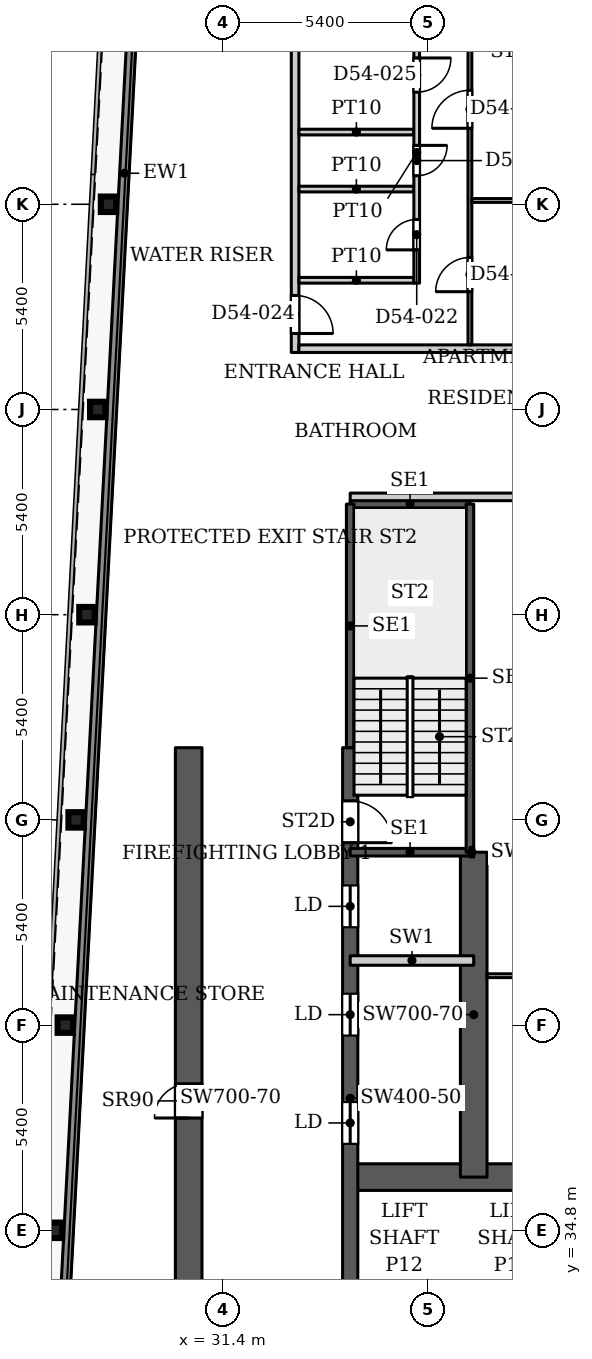
"""IFC4 building model, lengths in metres.
Left out: names, types, materials, properties, quantities, classifications, styles, units other than length and angle.
Written with IfcOpenShell. Run it as: python <this file> out.ifc"""

import sys

from ifc_helpers import new_model, si_unit, direction, frame, frame_2d, origin, origin_2d, place, context, subcontext, project, spatial, rectangle, i_section, extrude, source, transform, mapped, element, fill, save


model = new_model("IFC4")
c1 = context("Model", 3, precision=1e-05, world=origin(), true_north=direction((0.0, 1.0)))
c2 = subcontext(c1, "Body", "Model", "MODEL_VIEW")
j1 = project(units=[si_unit("LENGTHUNIT", "METRE"), si_unit("PLANEANGLEUNIT", "RADIAN")], contexts=[c1])
p1 = place(None, origin())
s1 = spatial("IfcSite", under=j1, at=p1, CompositionType="ELEMENT")
p2 = place(p1, origin())
s2 = spatial("IfcBuilding", under=s1, at=p2, CompositionType="ELEMENT")
p3 = place(p2, frame((0.0, 0.0, 231.8)))
s3 = spatial("IfcBuildingStorey", under=s2, at=p3, CompositionType="ELEMENT", Elevation=231.8)
for number, where, z_axis, x_axis in (
    (1, (26.969, 34.8, 0.0), (0.0, 0.0, 1.0), (1.0, 0.0, 0.0)),
    (2, (27.253, 40.2, 0.0), (0.0, 0.0, 1.0), (1.0, 0.0, 0.0)),
    (3, (27.537, 45.6, 0.0), (0.0, 0.0, 1.0), (1.0, 0.0, 0.0)),
    (4, (27.822, 51.0, 0.0), (0.0, 0.0, 1.0), (1.0, 0.0, 0.0)),
    (5, (28.106, 56.4, 0.0), (0.0, 0.0, 1.0), (1.0, 0.0, 0.0)),
    (6, (28.39, 61.8, 0.0), (0.0, 0.0, 1.0), (1.0, 0.0, 0.0)),
):
    element("IfcColumn", number, at=place(p3, frame(where, z_axis=z_axis, x_axis=x_axis)), inside=s3, PredefinedType="COLUMN", context=c2, shape_type="SweptSolid", body=[
        extrude(i_section(OverallWidth=0.404, OverallDepth=0.407, WebThickness=0.027, FlangeThickness=0.044, FilletRadius=0.012, at=origin_2d()), origin(), (0.0, 0.0, 1.0), 3.9),
    ])
p4 = place(p3, frame((34.75, 36.2, 0.0), z_axis=(0.0, 0.0, 1.0), x_axis=(1.0, 0.0, 0.0)))
e7 = element("IfcWall", 7, at=p4, inside=s3, PredefinedType="SHEAR", context=c2, shape_type="SweptSolid", body=[
    extrude(rectangle(XDim=18.4, YDim=0.7, at=frame_2d((9.2, 0.0))), origin(), (0.0, 0.0, 1.0), 3.9),
])
p5 = place(p4, frame((16.9, 0.0, 0.0)))
e8 = element("IfcOpeningElement", 8, at=p5, cuts=e7, PredefinedType="OPENING", context=c2, shape_type="SweptSolid", body=[
    extrude(rectangle(XDim=1.0, YDim=2.2, at=frame_2d((0.5, 1.1))), frame((0.0, 0.36, 0.0), z_axis=(0.0, -1.0, 0.0), x_axis=(1.0, 0.0, 0.0)), (0.0, 0.0, 1.0), 0.72),
])
p6 = place(p3, frame((34.75, 29.05, 0.0), z_axis=(0.0, 0.0, 1.0), x_axis=(0.0, 1.0, 0.0)))
e9 = element("IfcWall", 9, at=p6, inside=s3, PredefinedType="SHEAR", context=c2, shape_type="SweptSolid", body=[
    extrude(rectangle(XDim=18.45, YDim=0.4, at=frame_2d((9.225, 0.0))), origin(), (0.0, 0.0, 1.0), 3.9),
])
p7 = place(p6, frame((8.025, 0.0, 0.0)))
e10 = element("IfcOpeningElement", 10, at=p7, cuts=e9, PredefinedType="OPENING", context=c2, shape_type="SweptSolid", body=[
    extrude(rectangle(XDim=1.1, YDim=2.2, at=frame_2d((0.55, 1.1))), frame((0.0, 0.21, 0.0), z_axis=(0.0, -1.0, 0.0), x_axis=(1.0, 0.0, 0.0)), (0.0, 0.0, 1.0), 0.42),
])
p8 = place(p6, frame((10.875, 0.0, 0.0)))
e11 = element("IfcOpeningElement", 11, at=p8, cuts=e9, PredefinedType="OPENING", context=c2, shape_type="SweptSolid", body=[
    extrude(rectangle(XDim=1.1, YDim=2.2, at=frame_2d((0.55, 1.1))), frame((0.0, 0.21, 0.0), z_axis=(0.0, -1.0, 0.0), x_axis=(1.0, 0.0, 0.0)), (0.0, 0.0, 1.0), 0.42),
])
p9 = place(p6, frame((13.725, 0.0, 0.0)))
e12 = element("IfcOpeningElement", 12, at=p9, cuts=e9, PredefinedType="OPENING", context=c2, shape_type="SweptSolid", body=[
    extrude(rectangle(XDim=1.1, YDim=2.2, at=frame_2d((0.55, 1.1))), frame((0.0, 0.21, 0.0), z_axis=(0.0, -1.0, 0.0), x_axis=(1.0, 0.0, 0.0)), (0.0, 0.0, 1.0), 0.42),
])
p10 = place(p6, frame((15.95, 0.0, 0.0)))
e13 = element("IfcOpeningElement", 13, at=p10, cuts=e9, PredefinedType="OPENING", context=c2, shape_type="SweptSolid", body=[
    extrude(rectangle(XDim=1.1, YDim=2.2, at=frame_2d((0.55, 1.1))), frame((0.0, 0.21, 0.0), z_axis=(0.0, -1.0, 0.0), x_axis=(1.0, 0.0, 0.0)), (0.0, 0.0, 1.0), 0.42),
])
p11 = place(p3, frame((38.0, 36.2, 0.0), z_axis=(0.0, 0.0, 1.0), x_axis=(0.0, 1.0, 0.0)))
e14 = element("IfcWall", 14, at=p11, inside=s3, PredefinedType="SHEAR", context=c2, shape_type="SweptSolid", body=[
    extrude(rectangle(XDim=8.55, YDim=0.7, at=frame_2d((4.275, 0.0))), origin(), (0.0, 0.0, 1.0), 3.9),
])
p12 = place(p3, frame((30.5, 29.05, 0.0), z_axis=(0.0, 0.0, 1.0), x_axis=(0.0, 1.0, 0.0)))
e15 = element("IfcWall", 15, at=p12, inside=s3, PredefinedType="SHEAR", context=c2, shape_type="SweptSolid", body=[
    extrude(rectangle(XDim=18.45, YDim=0.7, at=frame_2d((9.225, 0.0))), origin(), (0.0, 0.0, 1.0), 3.9),
])
p13 = place(p12, frame((1.5, 0.0, 0.0)))
e16 = element("IfcOpeningElement", 16, at=p13, cuts=e15, PredefinedType="OPENING", context=c2, shape_type="SweptSolid", body=[
    extrude(rectangle(XDim=0.9, YDim=2.2, at=frame_2d((0.45, 1.1))), frame((0.0, 0.36, 0.0), z_axis=(0.0, -1.0, 0.0), x_axis=(1.0, 0.0, 0.0)), (0.0, 0.0, 1.0), 0.72),
])
p14 = place(p12, frame((8.705, 0.0, 0.0)))
e17 = element("IfcOpeningElement", 17, at=p14, cuts=e15, PredefinedType="OPENING", context=c2, shape_type="SweptSolid", body=[
    extrude(rectangle(XDim=0.9, YDim=2.2, at=frame_2d((0.45, 1.1))), frame((0.0, 0.36, 0.0), z_axis=(0.0, -1.0, 0.0), x_axis=(1.0, 0.0, 0.0)), (0.0, 0.0, 1.0), 0.72),
])
p15 = place(p3, frame((27.195, 31.969, 0.0), z_axis=(0.0, 0.0, 1.0), x_axis=(0.052555284099, 0.998618016117, 0.0)))
e18 = element("IfcWall", 18, at=p15, inside=s3, PredefinedType="SOLIDWALL", context=c2, shape_type="SweptSolid", body=[
    extrude(rectangle(XDim=61.38, YDim=0.25, at=frame_2d((30.69, 0.0))), origin(), (0.0, 0.0, 1.0), 3.75),
])
for number, where, z_axis, x_axis in (
    (19, (34.75, 44.75, 0.0), (0.0, 0.0, 1.0), (1.0, 0.0, 0.0)),
    (20, (34.75, 53.91, 0.0), (0.0, 0.0, 1.0), (1.0, 0.0, 0.0)),
):
    element("IfcWall", number, at=place(p3, frame(where, z_axis=z_axis, x_axis=x_axis)), inside=s3, PredefinedType="SHEAR", context=c2, shape_type="SweptSolid", body=[
        extrude(rectangle(XDim=3.15, YDim=0.2, at=frame_2d((1.575, 0.0))), origin(), (0.0, 0.0, 1.0), 3.9),
    ])
p16 = place(p3, frame((34.75, 47.5, 0.0), z_axis=(0.0, 0.0, 1.0), x_axis=(0.0, 1.0, 0.0)))
e21 = element("IfcWall", 21, at=p16, inside=s3, PredefinedType="SHEAR", context=c2, shape_type="SweptSolid", body=[
    extrude(rectangle(XDim=6.41, YDim=0.2, at=frame_2d((3.205, 0.0))), origin(), (0.0, 0.0, 1.0), 3.9),
])
p17 = place(p3, frame((37.9, 44.75, 0.0), z_axis=(0.0, 0.0, 1.0), x_axis=(0.0, 1.0, 0.0)))
e22 = element("IfcWall", 22, at=p17, inside=s3, PredefinedType="SHEAR", context=c2, shape_type="SweptSolid", body=[
    extrude(rectangle(XDim=9.16, YDim=0.2, at=frame_2d((4.58, 0.0))), origin(), (0.0, 0.0, 1.0), 3.9),
])
p18 = place(p3, frame((34.75, 41.9, 0.0), z_axis=(0.0, 0.0, 1.0), x_axis=(1.0, 0.0, 0.0)))
e23 = element("IfcWall", 23, at=p18, inside=s3, PredefinedType="PARTITIONING", context=c2, shape_type="SweptSolid", body=[
    extrude(rectangle(XDim=3.25, YDim=0.25, at=frame_2d((1.625, 0.0))), origin(), (0.0, 0.0, 1.0), 3.9),
])
p19 = place(p3, frame((37.9, 44.75, 0.0), z_axis=(0.0, 0.0, 1.0), x_axis=(1.0, 0.0, 0.0)))
e24 = element("IfcWall", 24, at=p19, inside=s3, PredefinedType="PARTITIONING", context=c2, shape_type="SweptSolid", body=[
    extrude(rectangle(XDim=0.1, YDim=0.25, at=frame_2d((0.05, 0.0))), origin(), (0.0, 0.0, 1.0), 3.9),
])
p20 = place(p3, frame((33.3, 57.9, 0.0), z_axis=(0.0, 0.0, 1.0), x_axis=(0.0, 1.0, 0.0)))
e25 = element("IfcWall", 25, at=p20, inside=s3, PredefinedType="PARTITIONING", context=c2, shape_type="SweptSolid", body=[
    extrude(rectangle(XDim=17.6, YDim=0.2, at=frame_2d((8.8, 0.0))), origin(), (0.0, 0.0, 1.0), 3.6),
])
p21 = place(p20, frame((0.5, 0.0, 0.0)))
e26 = element("IfcOpeningElement", 26, at=p21, cuts=e25, PredefinedType="OPENING", context=c2, shape_type="SweptSolid", body=[
    extrude(rectangle(XDim=1.0, YDim=2.1, at=frame_2d((0.5, 1.05))), frame((0.0, 0.11, 0.0), z_axis=(0.0, -1.0, 0.0), x_axis=(1.0, 0.0, 0.0)), (0.0, 0.0, 1.0), 0.22),
])
p22 = place(p20, frame((16.1, 0.0, 0.0)))
e27 = element("IfcOpeningElement", 27, at=p22, cuts=e25, PredefinedType="OPENING", context=c2, shape_type="SweptSolid", body=[
    extrude(rectangle(XDim=1.0, YDim=2.1, at=frame_2d((0.5, 1.05))), frame((0.0, 0.11, 0.0), z_axis=(0.0, -1.0, 0.0), x_axis=(1.0, 0.0, 0.0)), (0.0, 0.0, 1.0), 0.22),
])
p23 = place(p3, frame((33.4, 58.0, 0.0), z_axis=(0.0, 0.0, 1.0), x_axis=(1.0, 0.0, 0.0)))
e28 = element("IfcWall", 28, at=p23, inside=s3, PredefinedType="PARTITIONING", context=c2, shape_type="SweptSolid", body=[
    extrude(rectangle(XDim=12.5, YDim=0.2, at=frame_2d((6.25, 0.0))), origin(), (0.0, 0.0, 1.0), 3.6),
])
for number, where, z_axis, x_axis in (
    (29, (33.4, 59.8, 0.0), (0.0, 0.0, 1.0), (1.0, 0.0, 0.0)),
    (30, (33.4, 62.2, 0.0), (0.0, 0.0, 1.0), (1.0, 0.0, 0.0)),
    (31, (33.4, 63.7, 0.0), (0.0, 0.0, 1.0), (1.0, 0.0, 0.0)),
):
    element("IfcWall", number, at=place(p3, frame(where, z_axis=z_axis, x_axis=x_axis)), inside=s3, PredefinedType="PARTITIONING", context=c2, shape_type="SweptSolid", body=[
        extrude(rectangle(XDim=3.025, YDim=0.15, at=frame_2d((1.513, 0.0))), origin(), (0.0, 0.0, 1.0), 3.6),
    ])
p24 = place(p3, frame((34.75, 54.1, 0.0), z_axis=(0.0, 0.0, 1.0), x_axis=(1.0, 0.0, 0.0)))
e32 = element("IfcWall", 32, at=p24, inside=s3, PredefinedType="PARTITIONING", context=c2, shape_type="SweptSolid", body=[
    extrude(rectangle(XDim=11.15, YDim=0.2, at=frame_2d((5.575, 0.0))), origin(), (0.0, 0.0, 1.0), 3.6),
])
p25 = place(p24, frame((5.075, 0.0, 0.0)))
e33 = element("IfcOpeningElement", 33, at=p25, cuts=e32, PredefinedType="OPENING", context=c2, shape_type="SweptSolid", body=[
    extrude(rectangle(XDim=1.0, YDim=2.1, at=frame_2d((0.5, 1.05))), frame((0.0, 0.11, 0.0), z_axis=(0.0, -1.0, 0.0), x_axis=(1.0, 0.0, 0.0)), (0.0, 0.0, 1.0), 0.22),
])
p26 = place(p3, frame((36.5, 59.725, 0.0), z_axis=(0.0, 0.0, 1.0), x_axis=(0.0, 1.0, 0.0)))
e34 = element("IfcWall", 34, at=p26, inside=s3, PredefinedType="PARTITIONING", context=c2, shape_type="SweptSolid", body=[
    extrude(rectangle(XDim=6.875, YDim=0.15, at=frame_2d((3.438, 0.0))), origin(), (0.0, 0.0, 1.0), 3.6),
])
p27 = place(p26, frame((0.875, 0.0, 0.0)))
e35 = element("IfcOpeningElement", 35, at=p27, cuts=e34, PredefinedType="OPENING", context=c2, shape_type="SweptSolid", body=[
    extrude(rectangle(XDim=0.8, YDim=2.1, at=frame_2d((0.4, 1.05))), frame((0.0, 0.085, 0.0), z_axis=(0.0, -1.0, 0.0), x_axis=(1.0, 0.0, 0.0)), (0.0, 0.0, 1.0), 0.17),
])
p28 = place(p26, frame((5.025, 0.0, 0.0)))
e36 = element("IfcOpeningElement", 36, at=p28, cuts=e34, PredefinedType="OPENING", context=c2, shape_type="SweptSolid", body=[
    extrude(rectangle(XDim=0.9, YDim=2.1, at=frame_2d((0.45, 1.05))), frame((0.0, 0.085, 0.0), z_axis=(0.0, -1.0, 0.0), x_axis=(1.0, 0.0, 0.0)), (0.0, 0.0, 1.0), 0.17),
])
p29 = place(p26, frame((2.825, 0.0, 0.0)))
e37 = element("IfcOpeningElement", 37, at=p29, cuts=e34, PredefinedType="OPENING", context=c2, shape_type="SweptSolid", body=[
    extrude(rectangle(XDim=0.8, YDim=2.1, at=frame_2d((0.4, 1.05))), frame((0.0, 0.085, 0.0), z_axis=(0.0, -1.0, 0.0), x_axis=(1.0, 0.0, 0.0)), (0.0, 0.0, 1.0), 0.17),
])
p30 = place(p3, frame((37.9, 58.1, 0.0), z_axis=(0.0, 0.0, 1.0), x_axis=(0.0, 1.0, 0.0)))
e38 = element("IfcWall", 38, at=p30, inside=s3, PredefinedType="PARTITIONING", context=c2, shape_type="SweptSolid", body=[
    extrude(rectangle(XDim=8.5, YDim=0.1, at=frame_2d((4.25, 0.0))), origin(), (0.0, 0.0, 1.0), 3.6),
])
p31 = place(p30, frame((1.4, 0.0, 0.0)))
e39 = element("IfcOpeningElement", 39, at=p31, cuts=e38, PredefinedType="OPENING", context=c2, shape_type="SweptSolid", body=[
    extrude(rectangle(XDim=0.9, YDim=2.1, at=frame_2d((0.45, 1.05))), frame((0.0, 0.06, 0.0), z_axis=(0.0, -1.0, 0.0), x_axis=(1.0, 0.0, 0.0)), (0.0, 0.0, 1.0), 0.12),
])
p32 = place(p30, frame((5.7, 0.0, 0.0)))
e40 = element("IfcOpeningElement", 40, at=p32, cuts=e38, PredefinedType="OPENING", context=c2, shape_type="SweptSolid", body=[
    extrude(rectangle(XDim=1.0, YDim=2.1, at=frame_2d((0.5, 1.05))), frame((0.0, 0.06, 0.0), z_axis=(0.0, -1.0, 0.0), x_axis=(1.0, 0.0, 0.0)), (0.0, 0.0, 1.0), 0.12),
])
p33 = place(p3, frame((37.95, 61.9, 0.0), z_axis=(0.0, 0.0, 1.0), x_axis=(1.0, 0.0, 0.0)))
e41 = element("IfcWall", 41, at=p33, inside=s3, PredefinedType="PARTITIONING", context=c2, shape_type="SweptSolid", body=[
    extrude(rectangle(XDim=7.95, YDim=0.1, at=frame_2d((3.975, 0.0))), origin(), (0.0, 0.0, 1.0), 3.072),
])
p34 = place(p3, frame((38.349, 41.5, 0.0), z_axis=(0.0, 0.0, 1.0), x_axis=(1.0, 0.0, 0.0)))
e42 = element("IfcWall", 42, at=p34, inside=s3, PredefinedType="PARTITIONING", context=c2, shape_type="SweptSolid", body=[
    extrude(rectangle(XDim=14.951, YDim=0.1, at=frame_2d((7.476, 0.0))), origin(), (0.0, 0.0, 1.0), 3.6),
])
p35 = place(p34, frame((6.851, 0.0, 0.0)))
e43 = element("IfcOpeningElement", 43, at=p35, cuts=e42, PredefinedType="OPENING", context=c2, shape_type="SweptSolid", body=[
    extrude(rectangle(XDim=1.0, YDim=2.1, at=frame_2d((0.5, 1.05))), frame((0.0, 0.06, 0.0), z_axis=(0.0, -1.0, 0.0), x_axis=(1.0, 0.0, 0.0)), (0.0, 0.0, 1.0), 0.12),
])
m1 = source(origin(), c2, "Body", "SweptSolid", [
    extrude(rectangle(XDim=1.1, YDim=2.2, at=frame_2d((0.55, 1.1))), frame((0.0, 0.025, 0.0), z_axis=(0.0, -1.0, 0.0), x_axis=(1.0, 0.0, 0.0)), (0.0, 0.0, 1.0), 0.05),
])
p36 = place(p7, origin())
e44 = element("IfcDoor", 44, at=p36, inside=s3, OperationType="SLIDING_TO_LEFT", PredefinedType="DOOR", context=c2, shape_type="MappedRepresentation", body=[
    mapped(m1, transform((0.0, 0.0, 0.0), x_axis=(1.0, 0.0, 0.0), y_axis=(0.0, 1.0, 0.0), z_axis=(0.0, 0.0, 1.0), scale=1.0)),
])
fill(e10, e44)
p37 = place(p8, origin())
e45 = element("IfcDoor", 45, at=p37, inside=s3, OperationType="SLIDING_TO_LEFT", PredefinedType="DOOR", context=c2, shape_type="MappedRepresentation", body=[
    mapped(m1, transform((0.0, 0.0, 0.0), x_axis=(1.0, 0.0, 0.0), y_axis=(0.0, 1.0, 0.0), z_axis=(0.0, 0.0, 1.0), scale=1.0)),
])
fill(e11, e45)
p38 = place(p9, origin())
e46 = element("IfcDoor", 46, at=p38, inside=s3, OperationType="SLIDING_TO_LEFT", PredefinedType="DOOR", context=c2, shape_type="MappedRepresentation", body=[
    mapped(m1, transform((0.0, 0.0, 0.0), x_axis=(1.0, 0.0, 0.0), y_axis=(0.0, 1.0, 0.0), z_axis=(0.0, 0.0, 1.0), scale=1.0)),
])
fill(e12, e46)
m2 = source(origin(), c2, "Body", "SweptSolid", [
    extrude(rectangle(XDim=0.9, YDim=2.2, at=frame_2d((0.45, 1.1))), frame((0.0, 0.025, 0.0), z_axis=(0.0, -1.0, 0.0), x_axis=(1.0, 0.0, 0.0)), (0.0, 0.0, 1.0), 0.05),
])
p39 = place(p14, origin())
e47 = element("IfcDoor", 47, at=p39, inside=s3, OperationType="SINGLE_SWING_LEFT", PredefinedType="DOOR", context=c2, shape_type="MappedRepresentation", body=[
    mapped(m2, transform((0.0, 0.0, 0.0), x_axis=(1.0, 0.0, 0.0), y_axis=(0.0, 1.0, 0.0), z_axis=(0.0, 0.0, 1.0), scale=1.0)),
])
fill(e17, e47)
m3 = source(origin(), c2, "Body", "SweptSolid", [
    extrude(rectangle(XDim=1.1, YDim=2.2, at=frame_2d((0.55, 1.1))), frame((0.0, 0.025, 0.0), z_axis=(0.0, -1.0, 0.0), x_axis=(1.0, 0.0, 0.0)), (0.0, 0.0, 1.0), 0.05),
])
p40 = place(p10, origin())
e48 = element("IfcDoor", 48, at=p40, inside=s3, OperationType="SINGLE_SWING_RIGHT", PredefinedType="DOOR", context=c2, shape_type="MappedRepresentation", body=[
    mapped(m3, transform((0.0, 0.0, 0.0), x_axis=(1.0, 0.0, 0.0), y_axis=(0.0, 1.0, 0.0), z_axis=(0.0, 0.0, 1.0), scale=1.0)),
])
fill(e13, e48)
m4 = source(origin(), c2, "Body", "SweptSolid", [
    extrude(rectangle(XDim=0.8, YDim=2.1, at=frame_2d((0.4, 1.05))), frame((0.0, 0.025, 0.0), z_axis=(0.0, -1.0, 0.0), x_axis=(1.0, 0.0, 0.0)), (0.0, 0.0, 1.0), 0.05),
])
p41 = place(p27, origin())
e49 = element("IfcDoor", 49, at=p41, inside=s3, OperationType="SINGLE_SWING_LEFT", PredefinedType="DOOR", context=c2, shape_type="MappedRepresentation", body=[
    mapped(m4, transform((0.0, 0.0, 0.0), x_axis=(1.0, 0.0, 0.0), y_axis=(0.0, 1.0, 0.0), z_axis=(0.0, 0.0, 1.0), scale=1.0)),
])
fill(e35, e49)
m5 = source(origin(), c2, "Body", "SweptSolid", [
    extrude(rectangle(XDim=0.9, YDim=2.1, at=frame_2d((0.45, 1.05))), frame((0.0, 0.025, 0.0), z_axis=(0.0, -1.0, 0.0), x_axis=(1.0, 0.0, 0.0)), (0.0, 0.0, 1.0), 0.05),
])
p42 = place(p31, origin())
e50 = element("IfcDoor", 50, at=p42, inside=s3, OperationType="SINGLE_SWING_LEFT", PredefinedType="DOOR", context=c2, shape_type="MappedRepresentation", body=[
    mapped(m5, transform((0.0, 0.0, 0.0), x_axis=(1.0, 0.0, 0.0), y_axis=(0.0, 1.0, 0.0), z_axis=(0.0, 0.0, 1.0), scale=1.0)),
])
fill(e39, e50)
m6 = source(origin(), c2, "Body", "SweptSolid", [
    extrude(rectangle(XDim=1.0, YDim=2.1, at=frame_2d((0.5, 1.05))), frame((0.0, 0.025, 0.0), z_axis=(0.0, -1.0, 0.0), x_axis=(1.0, 0.0, 0.0)), (0.0, 0.0, 1.0), 0.05),
])
p43 = place(p21, origin())
e51 = element("IfcDoor", 51, at=p43, inside=s3, OperationType="SINGLE_SWING_RIGHT", PredefinedType="DOOR", context=c2, shape_type="MappedRepresentation", body=[
    mapped(m6, transform((0.0, 0.0, 0.0), x_axis=(1.0, 0.0, 0.0), y_axis=(0.0, 1.0, 0.0), z_axis=(0.0, 0.0, 1.0), scale=1.0)),
])
fill(e26, e51)
p44 = place(p28, origin())
e52 = element("IfcDoor", 52, at=p44, inside=s3, OperationType="SINGLE_SWING_RIGHT", PredefinedType="DOOR", context=c2, shape_type="MappedRepresentation", body=[
    mapped(m5, transform((0.0, 0.0, 0.0), x_axis=(1.0, 0.0, 0.0), y_axis=(0.0, 1.0, 0.0), z_axis=(0.0, 0.0, 1.0), scale=1.0)),
])
fill(e36, e52)
m7 = source(origin(), c2, "Body", "SweptSolid", [
    extrude(rectangle(XDim=1.0, YDim=2.1, at=frame_2d((0.5, 1.05))), frame((0.0, 0.025, 0.0), z_axis=(0.0, -1.0, 0.0), x_axis=(1.0, 0.0, 0.0)), (0.0, 0.0, 1.0), 0.05),
])
p45 = place(p32, origin())
e53 = element("IfcDoor", 53, at=p45, inside=s3, OperationType="SINGLE_SWING_LEFT", PredefinedType="DOOR", context=c2, shape_type="MappedRepresentation", body=[
    mapped(m7, transform((0.0, 0.0, 0.0), x_axis=(1.0, 0.0, 0.0), y_axis=(0.0, 1.0, 0.0), z_axis=(0.0, 0.0, 1.0), scale=1.0)),
])
fill(e40, e53)
p46 = place(p29, origin())
e54 = element("IfcDoor", 54, at=p46, inside=s3, OperationType="SINGLE_SWING_RIGHT", PredefinedType="DOOR", context=c2, shape_type="MappedRepresentation", body=[
    mapped(m4, transform((0.0, 0.0, 0.0), x_axis=(1.0, 0.0, 0.0), y_axis=(0.0, 1.0, 0.0), z_axis=(0.0, 0.0, 1.0), scale=1.0)),
])
fill(e37, e54)
save(model, sys.argv[1])
